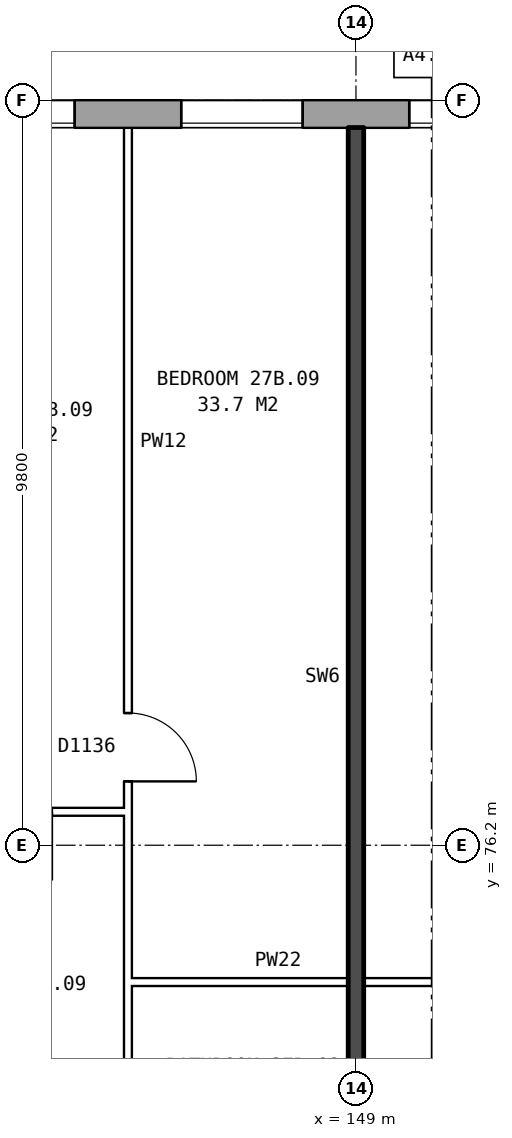
"""IFC4 building model, lengths in metres.
Left out: names, types, materials, properties, quantities, classifications, styles, units other than length and angle.
Written with IfcOpenShell. Run it as: python <this file> out.ifc"""

import sys

from ifc_helpers import new_model, si_unit, direction, frame, frame_2d, origin, place, context, subcontext, project, spatial, rectangle, extrude, element, fill, save


model = new_model("IFC4")
c1 = context("Model", 3, precision=1e-05, world=origin(), true_north=direction((0.0, 1.0)))
c2 = subcontext(c1, "Body", "Model", "MODEL_VIEW")
j1 = project(units=[si_unit("LENGTHUNIT", "METRE"), si_unit("PLANEANGLEUNIT", "RADIAN")], contexts=[c1])
p1 = place(None, origin())
s1 = spatial("IfcSite", under=j1, at=p1, CompositionType="ELEMENT")
p2 = place(p1, origin())
s2 = spatial("IfcBuilding", under=s1, at=p2, CompositionType="ELEMENT")
p3 = place(p2, frame((0.0, 0.0, 99.5)))
s3 = spatial("IfcBuildingStorey", under=s2, at=p3, CompositionType="ELEMENT", Elevation=99.5)
p4 = place(p3, frame((170.925, 85.82, 0.0), z_axis=(0.0, 0.0, 1.0), x_axis=(-1.0, 0.0, 0.0)))
e1 = element("IfcWall", 1, at=p4, inside=s3, PredefinedType="STANDARD", context=c2, shape_type="SweptSolid", body=[
    extrude(rectangle(XDim=36.851, YDim=0.36, at=frame_2d((18.425, 0.0))), origin(), (0.0, 0.0, 1.0), 2.85),
])
p5 = place(p4, frame((0.3, 0.0, 0.8)))
e2 = element("IfcOpeningElement", 2, at=p5, cuts=e1, PredefinedType="OPENING", context=c2, shape_type="SweptSolid", body=[
    extrude(rectangle(XDim=1.0, YDim=1.8, at=frame_2d((0.5, 0.9))), frame((0.0, 0.19, 0.0), z_axis=(0.0, -1.0, 0.0), x_axis=(1.0, 0.0, 0.0)), (0.0, 0.0, 1.0), 0.38),
])
p6 = place(p4, frame((4.625, 0.0, 0.8)))
e3 = element("IfcOpeningElement", 3, at=p6, cuts=e1, PredefinedType="OPENING", context=c2, shape_type="SweptSolid", body=[
    extrude(rectangle(XDim=1.6, YDim=1.8, at=frame_2d((0.8, 0.9))), frame((0.0, 0.19, 0.0), z_axis=(0.0, -1.0, 0.0), x_axis=(1.0, 0.0, 0.0)), (0.0, 0.0, 1.0), 0.38),
])
p7 = place(p4, frame((7.625, 0.0, 0.8)))
e4 = element("IfcOpeningElement", 4, at=p7, cuts=e1, PredefinedType="OPENING", context=c2, shape_type="SweptSolid", body=[
    extrude(rectangle(XDim=1.6, YDim=1.8, at=frame_2d((0.8, 0.9))), frame((0.0, 0.19, 0.0), z_axis=(0.0, -1.0, 0.0), x_axis=(1.0, 0.0, 0.0)), (0.0, 0.0, 1.0), 0.38),
])
p8 = place(p4, frame((10.625, 0.0, 0.8)))
e5 = element("IfcOpeningElement", 5, at=p8, cuts=e1, PredefinedType="OPENING", context=c2, shape_type="SweptSolid", body=[
    extrude(rectangle(XDim=1.6, YDim=1.8, at=frame_2d((0.8, 0.9))), frame((0.0, 0.19, 0.0), z_axis=(0.0, -1.0, 0.0), x_axis=(1.0, 0.0, 0.0)), (0.0, 0.0, 1.0), 0.38),
])
p9 = place(p4, frame((13.625, 0.0, 0.8)))
e6 = element("IfcOpeningElement", 6, at=p9, cuts=e1, PredefinedType="OPENING", context=c2, shape_type="SweptSolid", body=[
    extrude(rectangle(XDim=1.6, YDim=1.8, at=frame_2d((0.8, 0.9))), frame((0.0, 0.19, 0.0), z_axis=(0.0, -1.0, 0.0), x_axis=(1.0, 0.0, 0.0)), (0.0, 0.0, 1.0), 0.38),
])
p10 = place(p4, frame((16.625, 0.0, 0.8)))
e7 = element("IfcOpeningElement", 7, at=p10, cuts=e1, PredefinedType="OPENING", context=c2, shape_type="SweptSolid", body=[
    extrude(rectangle(XDim=1.6, YDim=1.8, at=frame_2d((0.8, 0.9))), frame((0.0, 0.19, 0.0), z_axis=(0.0, -1.0, 0.0), x_axis=(1.0, 0.0, 0.0)), (0.0, 0.0, 1.0), 0.38),
])
p11 = place(p4, frame((19.625, 0.0, 0.8)))
e8 = element("IfcOpeningElement", 8, at=p11, cuts=e1, PredefinedType="OPENING", context=c2, shape_type="SweptSolid", body=[
    extrude(rectangle(XDim=1.6, YDim=1.8, at=frame_2d((0.8, 0.9))), frame((0.0, 0.19, 0.0), z_axis=(0.0, -1.0, 0.0), x_axis=(1.0, 0.0, 0.0)), (0.0, 0.0, 1.0), 0.38),
])
p12 = place(p4, frame((22.625, 0.0, 0.8)))
e9 = element("IfcOpeningElement", 9, at=p12, cuts=e1, PredefinedType="OPENING", context=c2, shape_type="SweptSolid", body=[
    extrude(rectangle(XDim=1.6, YDim=1.8, at=frame_2d((0.8, 0.9))), frame((0.0, 0.19, 0.0), z_axis=(0.0, -1.0, 0.0), x_axis=(1.0, 0.0, 0.0)), (0.0, 0.0, 1.0), 0.38),
])
p13 = place(p4, frame((25.625, 0.0, 0.8)))
e10 = element("IfcOpeningElement", 10, at=p13, cuts=e1, PredefinedType="OPENING", context=c2, shape_type="SweptSolid", body=[
    extrude(rectangle(XDim=1.6, YDim=1.8, at=frame_2d((0.8, 0.9))), frame((0.0, 0.19, 0.0), z_axis=(0.0, -1.0, 0.0), x_axis=(1.0, 0.0, 0.0)), (0.0, 0.0, 1.0), 0.38),
])
p14 = place(p4, frame((28.625, 0.0, 0.8)))
e11 = element("IfcOpeningElement", 11, at=p14, cuts=e1, PredefinedType="OPENING", context=c2, shape_type="SweptSolid", body=[
    extrude(rectangle(XDim=1.6, YDim=1.8, at=frame_2d((0.8, 0.9))), frame((0.0, 0.19, 0.0), z_axis=(0.0, -1.0, 0.0), x_axis=(1.0, 0.0, 0.0)), (0.0, 0.0, 1.0), 0.38),
])
p15 = place(p4, frame((30.525, 0.0, 0.8)))
e12 = element("IfcOpeningElement", 12, at=p15, cuts=e1, PredefinedType="OPENING", context=c2, shape_type="SweptSolid", body=[
    extrude(rectangle(XDim=1.6, YDim=1.8, at=frame_2d((0.8, 0.9))), frame((0.0, 0.19, 0.0), z_axis=(0.0, -1.0, 0.0), x_axis=(1.0, 0.0, 0.0)), (0.0, 0.0, 1.0), 0.38),
])
p16 = place(p4, frame((34.425, 0.0, 1.7)))
e13 = element("IfcOpeningElement", 13, at=p16, cuts=e1, PredefinedType="OPENING", context=c2, shape_type="SweptSolid", body=[
    extrude(rectangle(XDim=0.8, YDim=0.9, at=frame_2d((0.4, 0.45))), frame((0.0, 0.19, 0.0), z_axis=(0.0, -1.0, 0.0), x_axis=(1.0, 0.0, 0.0)), (0.0, 0.0, 1.0), 0.38),
])
p17 = place(p4, frame((1.6, 0.0, 1.7)))
e14 = element("IfcOpeningElement", 14, at=p17, cuts=e1, PredefinedType="OPENING", context=c2, shape_type="SweptSolid", body=[
    extrude(rectangle(XDim=0.8, YDim=0.9, at=frame_2d((0.4, 0.45))), frame((0.0, 0.19, 0.0), z_axis=(0.0, -1.0, 0.0), x_axis=(1.0, 0.0, 0.0)), (0.0, 0.0, 1.0), 0.38),
])
p18 = place(p4, frame((32.425, 0.0, 0.8)))
e15 = element("IfcOpeningElement", 15, at=p18, cuts=e1, PredefinedType="OPENING", context=c2, shape_type="SweptSolid", body=[
    extrude(rectangle(XDim=0.8, YDim=0.9, at=frame_2d((0.4, 0.45))), frame((0.0, 0.19, 0.0), z_axis=(0.0, -1.0, 0.0), x_axis=(1.0, 0.0, 0.0)), (0.0, 0.0, 1.0), 0.38),
])
p19 = place(p4, frame((35.525, 0.0, 0.8)))
e16 = element("IfcOpeningElement", 16, at=p19, cuts=e1, PredefinedType="OPENING", context=c2, shape_type="SweptSolid", body=[
    extrude(rectangle(XDim=1.0, YDim=1.8, at=frame_2d((0.5, 0.9))), frame((0.0, 0.19, 0.0), z_axis=(0.0, -1.0, 0.0), x_axis=(1.0, 0.0, 0.0)), (0.0, 0.0, 1.0), 0.38),
])
p20 = place(p3, frame((146.0, 74.4, 0.0), z_axis=(0.0, 0.0, 1.0), x_axis=(1.0, 0.0, 0.0)))
e17 = element("IfcWall", 17, at=p20, inside=s3, PredefinedType="PARTITIONING", context=c2, shape_type="SweptSolid", body=[
    extrude(rectangle(XDim=6.0, YDim=0.1, at=frame_2d((3.0, 0.0))), origin(), (0.0, 0.0, 1.0), 2.85),
])
p21 = place(p3, frame((143.1, 76.64, 0.0), z_axis=(0.0, 0.0, 1.0), x_axis=(1.0, 0.0, 0.0)))
e18 = element("IfcWall", 18, at=p21, inside=s3, PredefinedType="PARTITIONING", context=c2, shape_type="SweptSolid", body=[
    extrude(rectangle(XDim=2.9, YDim=0.1, at=frame_2d((1.45, 0.0))), origin(), (0.0, 0.0, 1.0), 2.85),
])
p22 = place(p21, frame((1.0, 0.0, 0.0)))
e19 = element("IfcOpeningElement", 19, at=p22, cuts=e18, PredefinedType="OPENING", context=c2, shape_type="SweptSolid", body=[
    extrude(rectangle(XDim=0.9, YDim=2.1, at=frame_2d((0.45, 1.05))), frame((0.0, 0.06, 0.0), z_axis=(0.0, -1.0, 0.0), x_axis=(1.0, 0.0, 0.0)), (0.0, 0.0, 1.0), 0.12),
])
p23 = place(p3, frame((146.0, 71.3, 0.0), z_axis=(0.0, 0.0, 1.0), x_axis=(0.0, 1.0, 0.0)))
e20 = element("IfcWall", 20, at=p23, inside=s3, PredefinedType="PARTITIONING", context=c2, shape_type="SweptSolid", body=[
    extrude(rectangle(XDim=14.34, YDim=0.1, at=frame_2d((7.17, 0.0))), origin(), (0.0, 0.0, 1.0), 2.85),
])
p24 = place(p23, frame((5.74, 0.0, 0.0)))
e21 = element("IfcOpeningElement", 21, at=p24, cuts=e20, PredefinedType="OPENING", context=c2, shape_type="SweptSolid", body=[
    extrude(rectangle(XDim=0.9, YDim=2.1, at=frame_2d((0.45, 1.05))), frame((0.0, 0.06, 0.0), z_axis=(0.0, -1.0, 0.0), x_axis=(1.0, 0.0, 0.0)), (0.0, 0.0, 1.0), 0.12),
])
p25 = place(p23, frame((0.4, 0.0, 0.0)))
e22 = element("IfcOpeningElement", 22, at=p25, cuts=e20, PredefinedType="OPENING", context=c2, shape_type="SweptSolid", body=[
    extrude(rectangle(XDim=0.9, YDim=2.1, at=frame_2d((0.45, 1.05))), frame((0.0, 0.06, 0.0), z_axis=(0.0, -1.0, 0.0), x_axis=(1.0, 0.0, 0.0)), (0.0, 0.0, 1.0), 0.12),
])
p26 = place(p3, frame((149.0, 71.2, 0.0), z_axis=(0.0, 0.0, 1.0), x_axis=(0.0, 1.0, 0.0)))
e23 = element("IfcWall", 23, at=p26, inside=s3, PredefinedType="SOLIDWALL", context=c2, shape_type="SweptSolid", body=[
    extrude(rectangle(XDim=14.44, YDim=0.2, at=frame_2d((7.22, 0.0))), origin(), (0.0, 0.0, 1.0), 2.85),
])
p27 = place(p11, origin())
e24 = element("IfcWindow", 24, at=p27, inside=s3, PartitioningType="SINGLE_PANEL", PredefinedType="WINDOW", context=c2, shape_type="SweptSolid", body=[
    extrude(rectangle(XDim=1.6, YDim=1.8, at=frame_2d((0.8, 0.9))), frame((0.0, 0.15, 0.0), z_axis=(0.0, -1.0, 0.0), x_axis=(1.0, 0.0, 0.0)), (0.0, 0.0, 1.0), 0.06),
])
fill(e8, e24)
p28 = place(p12, origin())
e25 = element("IfcWindow", 25, at=p28, inside=s3, PartitioningType="SINGLE_PANEL", PredefinedType="WINDOW", context=c2, shape_type="SweptSolid", body=[
    extrude(rectangle(XDim=1.6, YDim=1.8, at=frame_2d((0.8, 0.9))), frame((0.0, 0.15, 0.0), z_axis=(0.0, -1.0, 0.0), x_axis=(1.0, 0.0, 0.0)), (0.0, 0.0, 1.0), 0.06),
])
fill(e9, e25)
p29 = place(p13, origin())
e26 = element("IfcWindow", 26, at=p29, inside=s3, PartitioningType="SINGLE_PANEL", PredefinedType="WINDOW", context=c2, shape_type="SweptSolid", body=[
    extrude(rectangle(XDim=1.6, YDim=1.8, at=frame_2d((0.8, 0.9))), frame((0.0, 0.15, 0.0), z_axis=(0.0, -1.0, 0.0), x_axis=(1.0, 0.0, 0.0)), (0.0, 0.0, 1.0), 0.06),
])
fill(e10, e26)
p30 = place(p24, frame((0.9, 0.0, 0.0), z_axis=(0.0, 0.0, 1.0), x_axis=(-1.0, 0.0, 0.0)))
e27 = element("IfcDoor", 27, at=p30, inside=s3, OperationType="SINGLE_SWING_RIGHT", PredefinedType="DOOR", context=c2, shape_type="SweptSolid", body=[
    extrude(rectangle(XDim=0.9, YDim=2.1, at=frame_2d((0.45, 1.05))), frame((0.0, 0.025, 0.0), z_axis=(0.0, -1.0, 0.0), x_axis=(1.0, 0.0, 0.0)), (0.0, 0.0, 1.0), 0.05),
])
fill(e21, e27)
save(model, sys.argv[1])
